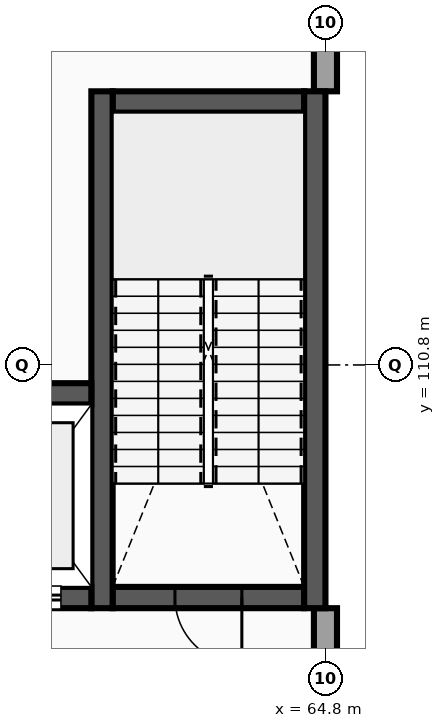
"""IFC4 building model, lengths in metres.
Left out: names, types, materials, properties, quantities, classifications, styles, units other than length and angle.
Written with IfcOpenShell. Run it as: python <this file> out.ifc"""

import sys

from ifc_helpers import new_model, si_unit, direction, frame, frame_2d, origin, place, context, subcontext, project, spatial, rectangle, extrude, element, fill, save


model = new_model("IFC4")
c1 = context("Model", 3, precision=1e-05, world=origin(), true_north=direction((0.0, 1.0)))
c2 = subcontext(c1, "Body", "Model", "MODEL_VIEW")
j1 = project(units=[si_unit("LENGTHUNIT", "METRE"), si_unit("PLANEANGLEUNIT", "RADIAN")], contexts=[c1])
p1 = place(None, origin())
s1 = spatial("IfcSite", under=j1, at=p1, CompositionType="ELEMENT")
p2 = place(p1, origin())
s2 = spatial("IfcBuilding", under=s1, at=p2, CompositionType="ELEMENT")
p3 = place(p2, frame((0.0, 0.0, 9.6)))
s3 = spatial("IfcBuildingStorey", under=s2, at=p3, CompositionType="ELEMENT", Elevation=9.6)
p4 = place(p3, frame((64.8, 103.6, 0.0), z_axis=(0.0, 0.0, 1.0), x_axis=(0.0, 1.0, 0.0)))
e1 = element("IfcWall", 1, at=p4, inside=s3, PredefinedType="STANDARD", context=c2, shape_type="SweptSolid", body=[
    extrude(rectangle(XDim=3.2, YDim=0.38, at=frame_2d((1.6, 0.0))), origin(), (0.0, 0.0, 1.0), 4.2),
])
p5 = place(p4, frame((0.7, 0.0, 0.9)))
e2 = element("IfcOpeningElement", 2, at=p5, cuts=e1, PredefinedType="OPENING", context=c2, shape_type="SweptSolid", body=[
    extrude(rectangle(XDim=1.8, YDim=1.8, at=frame_2d((0.9, 0.9))), frame((0.0, 0.2, 0.0), z_axis=(0.0, -1.0, 0.0), x_axis=(1.0, 0.0, 0.0)), (0.0, 0.0, 1.0), 0.4),
])
p6 = place(p3, frame((64.8, 115.3, 0.0), z_axis=(0.0, 0.0, 1.0), x_axis=(0.0, 1.0, 0.0)))
e3 = element("IfcWall", 3, at=p6, inside=s3, PredefinedType="STANDARD", context=c2, shape_type="SweptSolid", body=[
    extrude(rectangle(XDim=2.51, YDim=0.38, at=frame_2d((1.255, 0.0))), origin(), (0.0, 0.0, 1.0), 4.2),
])
p7 = place(p3, frame((61.3, 106.975, 0.0), z_axis=(0.0, 0.0, 1.0), x_axis=(1.0, 0.0, 0.0)))
e4 = element("IfcWall", 4, at=p7, inside=s3, PredefinedType="SHEAR", context=c2, shape_type="SweptSolid", body=[
    extrude(rectangle(XDim=3.15, YDim=0.35, at=frame_2d((1.575, 0.0))), origin(), (0.0, 0.0, 1.0), 4.2),
])
p8 = place(p7, frame((1.025, 0.0, 0.0)))
e5 = element("IfcOpeningElement", 5, at=p8, cuts=e4, PredefinedType="OPENING", context=c2, shape_type="SweptSolid", body=[
    extrude(rectangle(XDim=1.1, YDim=2.15, at=frame_2d((0.55, 1.075))), frame((0.0, 0.185, 0.0), z_axis=(0.0, -1.0, 0.0), x_axis=(1.0, 0.0, 0.0)), (0.0, 0.0, 1.0), 0.37),
])
p9 = place(p3, frame((61.3, 115.125, 0.0), z_axis=(0.0, 0.0, 1.0), x_axis=(1.0, 0.0, 0.0)))
e6 = element("IfcWall", 6, at=p9, inside=s3, PredefinedType="SHEAR", context=c2, shape_type="SweptSolid", body=[
    extrude(rectangle(XDim=3.15, YDim=0.35, at=frame_2d((1.575, 0.0))), origin(), (0.0, 0.0, 1.0), 4.2),
])
for number, where, z_axis, x_axis in (
    (7, (61.125, 106.8, 0.0), (0.0, 0.0, 1.0), (0.0, 1.0, 0.0)),
    (8, (64.625, 106.8, 0.0), (0.0, 0.0, 1.0), (0.0, 1.0, 0.0)),
):
    element("IfcWall", number, at=place(p3, frame(where, z_axis=z_axis, x_axis=x_axis)), inside=s3, PredefinedType="SHEAR", context=c2, shape_type="SweptSolid", body=[
        extrude(rectangle(XDim=8.5, YDim=0.35, at=frame_2d((4.25, 0.0))), origin(), (0.0, 0.0, 1.0), 4.2),
    ])
p10 = place(p3, frame((58.75, 106.975, 0.0), z_axis=(0.0, 0.0, 1.0), x_axis=(1.0, 0.0, 0.0)))
e9 = element("IfcWall", 9, at=p10, inside=s3, PredefinedType="SHEAR", context=c2, shape_type="SweptSolid", body=[
    extrude(rectangle(XDim=2.2, YDim=0.35, at=frame_2d((1.1, 0.0))), origin(), (0.0, 0.0, 1.0), 4.2),
])
p11 = place(p10, frame((0.5, 0.0, 0.0)))
e10 = element("IfcOpeningElement", 10, at=p11, cuts=e9, PredefinedType="OPENING", context=c2, shape_type="SweptSolid", body=[
    extrude(rectangle(XDim=1.2, YDim=2.2, at=frame_2d((0.6, 1.1))), frame((0.0, 0.185, 0.0), z_axis=(0.0, -1.0, 0.0), x_axis=(1.0, 0.0, 0.0)), (0.0, 0.0, 1.0), 0.37),
])
p12 = place(p3, frame((58.75, 110.325, 0.0), z_axis=(0.0, 0.0, 1.0), x_axis=(1.0, 0.0, 0.0)))
e11 = element("IfcWall", 11, at=p12, inside=s3, PredefinedType="SHEAR", context=c2, shape_type="SweptSolid", body=[
    extrude(rectangle(XDim=2.2, YDim=0.35, at=frame_2d((1.1, 0.0))), origin(), (0.0, 0.0, 1.0), 4.2),
])
p13 = place(p8, origin())
e12 = element("IfcDoor", 12, at=p13, inside=s3, OperationType="SINGLE_SWING_RIGHT", PredefinedType="DOOR", context=c2, shape_type="SweptSolid", body=[
    extrude(rectangle(XDim=1.1, YDim=2.15, at=frame_2d((0.55, 1.075))), frame((0.0, 0.025, 0.0), z_axis=(0.0, -1.0, 0.0), x_axis=(1.0, 0.0, 0.0)), (0.0, 0.0, 1.0), 0.05),
])
fill(e5, e12)
p14 = place(p11, origin())
e13 = element("IfcDoor", 13, at=p14, inside=s3, OperationType="SLIDING_TO_RIGHT", PredefinedType="DOOR", context=c2, shape_type="SweptSolid", body=[
    extrude(rectangle(XDim=1.2, YDim=2.2, at=frame_2d((0.6, 1.1))), frame((0.0, 0.025, 0.0), z_axis=(0.0, -1.0, 0.0), x_axis=(1.0, 0.0, 0.0)), (0.0, 0.0, 1.0), 0.05),
])
fill(e10, e13)
save(model, sys.argv[1])
